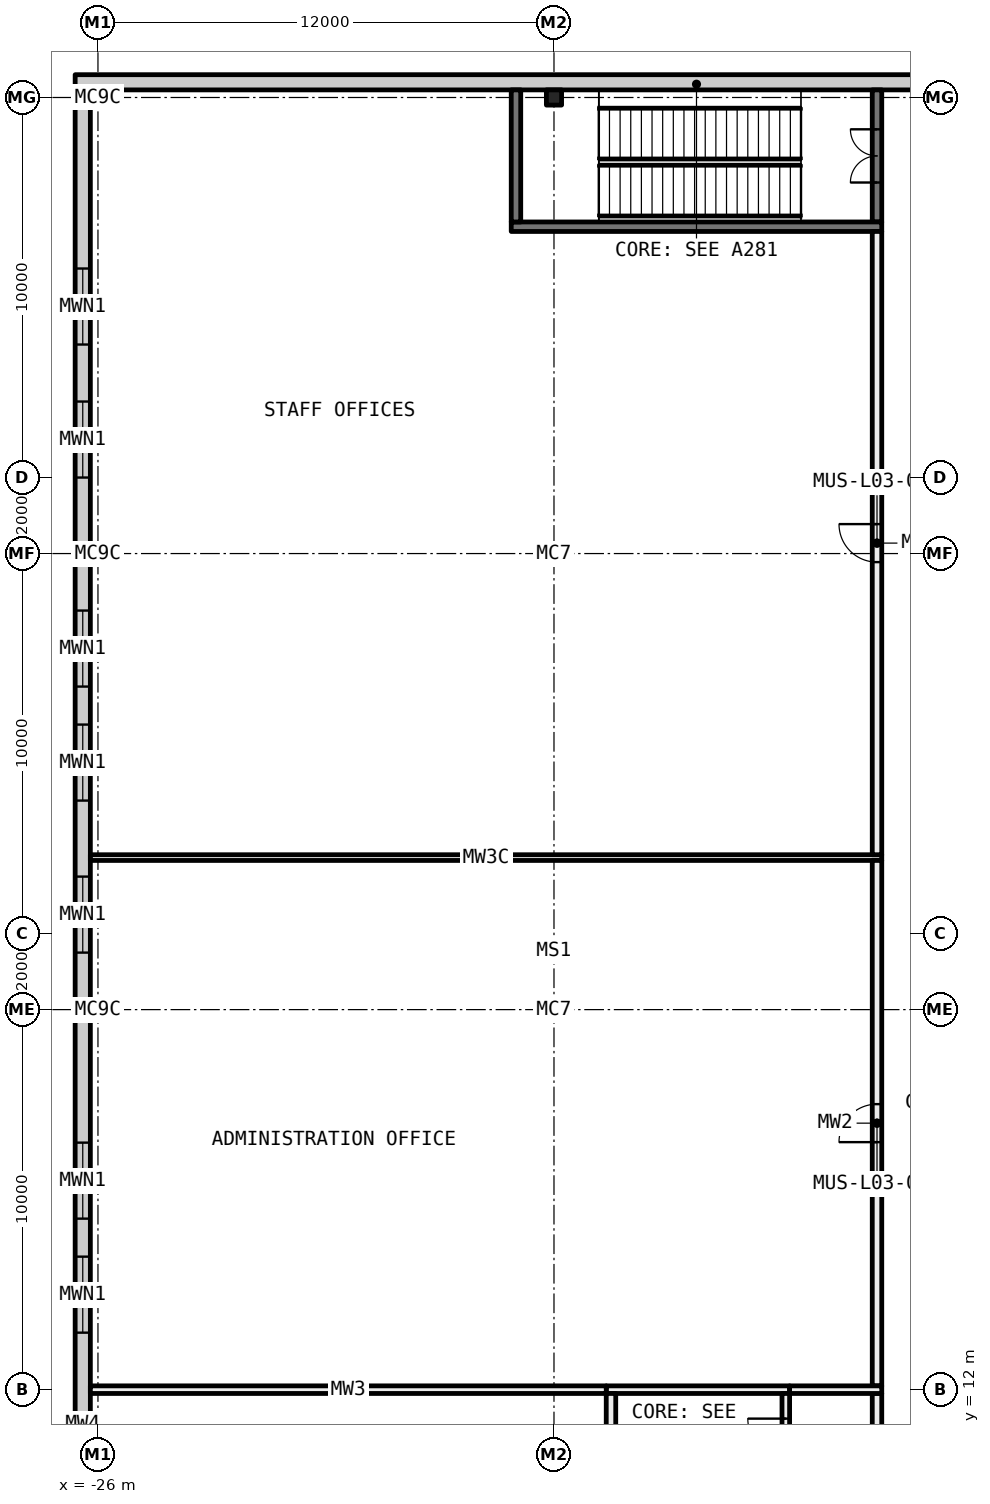
"""IFC4 building model, lengths in metres.
Left out: names, types, materials, properties, quantities, classifications, styles, units other than length and angle.
Written with IfcOpenShell. Run it as: python <this file> out.ifc"""

import sys

from ifc_helpers import new_model, si_unit, direction, frame, frame_2d, origin, origin_2d, place, context, subcontext, project, spatial, rectangle, i_section, extrude, element, fill, save


model = new_model("IFC4")
c1 = context("Model", 3, precision=1e-05, world=origin(), true_north=direction((0.0, 1.0)))
c2 = subcontext(c1, "Body", "Model", "MODEL_VIEW")
j1 = project(units=[si_unit("LENGTHUNIT", "METRE"), si_unit("PLANEANGLEUNIT", "RADIAN")], contexts=[c1])
p1 = place(None, origin())
s1 = spatial("IfcSite", under=j1, at=p1, CompositionType="ELEMENT")
p2 = place(p1, origin())
s2 = spatial("IfcBuilding", under=s1, at=p2, CompositionType="ELEMENT")
p3 = place(p2, frame((0.0, 0.0, 18.0)))
s3 = spatial("IfcBuildingStorey", under=s2, at=p3, CompositionType="ELEMENT", Elevation=18.0)
for number, where, z_axis, x_axis in (
    (1, (-26.0, 22.0, 0.0), (0.0, 0.0, 1.0), (1.0, 0.0, 0.0)),
    (2, (-26.0, 34.0, 0.0), (0.0, 0.0, 1.0), (1.0, 0.0, 0.0)),
    (3, (-26.0, 46.0, 0.0), (0.0, 0.0, 1.0), (1.0, 0.0, 0.0)),
):
    element("IfcColumn", number, at=place(p3, frame(where, z_axis=z_axis, x_axis=x_axis)), inside=s3, PredefinedType="COLUMN", context=c2, shape_type="SweptSolid", body=[
        extrude(i_section(OverallWidth=0.4, OverallDepth=0.4, WebThickness=0.013, FlangeThickness=0.021, FilletRadius=0.022, at=origin_2d()), origin(), (0.0, 0.0, 1.0), 5.6),
    ])
for number, where, z_axis, x_axis in (
    (4, (-14.0, 22.0, 0.0), (0.0, 0.0, 1.0), (1.0, 0.0, 0.0)),
    (5, (-14.0, 34.0, 0.0), (0.0, 0.0, 1.0), (1.0, 0.0, 0.0)),
):
    element("IfcColumn", number, at=place(p3, frame(where, z_axis=z_axis, x_axis=x_axis)), inside=s3, PredefinedType="COLUMN", context=c2, shape_type="SweptSolid", body=[
        extrude(i_section(OverallWidth=0.35, OverallDepth=0.35, WebThickness=0.012, FlangeThickness=0.019, FilletRadius=0.013, at=origin_2d()), origin(), (0.0, 0.0, 1.0), 5.6),
    ])
p4 = place(p3, frame((-14.0, 46.0, 0.0), z_axis=(0.0, 0.0, 1.0), x_axis=(1.0, 0.0, 0.0)))
e6 = element("IfcColumn", 6, at=p4, inside=s3, PredefinedType="COLUMN", context=c2, shape_type="SweptSolid", body=[
    extrude(i_section(OverallWidth=0.4, OverallDepth=0.4, WebThickness=0.013, FlangeThickness=0.021, FilletRadius=0.022, at=origin_2d()), origin(), (0.0, 0.0, 1.0), 5.6),
])
p5 = place(p3, frame((-12.625, 12.0, 0.0), z_axis=(0.0, 0.0, 1.0), x_axis=(1.0, 0.0, 0.0)))
e7 = element("IfcWall", 7, at=p5, inside=s3, PredefinedType="PARTITIONING", context=c2, shape_type="SweptSolid", body=[
    extrude(rectangle(XDim=4.825, YDim=0.2, at=frame_2d((2.413, 0.0))), origin(), (0.0, 0.0, 1.0), 5.6),
])
p6 = place(p3, frame((-12.5, 9.575, 0.0), z_axis=(0.0, 0.0, 1.0), x_axis=(0.0, 1.0, 0.0)))
e8 = element("IfcWall", 8, at=p6, inside=s3, PredefinedType="PARTITIONING", context=c2, shape_type="SweptSolid", body=[
    extrude(rectangle(XDim=2.325, YDim=0.25, at=frame_2d((1.163, 0.0))), origin(), (0.0, 0.0, 1.0), 5.6),
])
p7 = place(p3, frame((-26.2, 26.0, 0.0), z_axis=(0.0, 0.0, 1.0), x_axis=(1.0, 0.0, 0.0)))
e9 = element("IfcWall", 9, at=p7, inside=s3, PredefinedType="PARTITIONING", context=c2, shape_type="SweptSolid", body=[
    extrude(rectangle(XDim=20.825, YDim=0.15, at=frame_2d((10.413, 0.0))), origin(), (0.0, 0.0, 1.0), 5.6),
])
p8 = place(p3, frame((-5.5, 12.1, 0.0), z_axis=(0.0, 0.0, 1.0), x_axis=(0.0, 1.0, 0.0)))
e10 = element("IfcWall", 10, at=p8, inside=s3, PredefinedType="PARTITIONING", context=c2, shape_type="SweptSolid", body=[
    extrude(rectangle(XDim=13.825, YDim=0.25, at=frame_2d((6.913, 0.0))), origin(), (0.0, 0.0, 1.0), 5.6),
])
p9 = place(p8, frame((6.413, 0.0, 0.0)))
e11 = element("IfcOpeningElement", 11, at=p9, cuts=e10, PredefinedType="OPENING", context=c2, shape_type="SweptSolid", body=[
    extrude(rectangle(XDim=1.0, YDim=2.1, at=frame_2d((0.5, 1.05))), frame((0.0, 0.135, 0.0), z_axis=(0.0, -1.0, 0.0), x_axis=(1.0, 0.0, 0.0)), (0.0, 0.0, 1.0), 0.27),
])
p10 = place(p3, frame((-5.5, 26.075, 0.0), z_axis=(0.0, 0.0, 1.0), x_axis=(0.0, 1.0, 0.0)))
e12 = element("IfcWall", 12, at=p10, inside=s3, PredefinedType="PARTITIONING", context=c2, shape_type="SweptSolid", body=[
    extrude(rectangle(XDim=16.4, YDim=0.25, at=frame_2d((8.2, 0.0))), origin(), (0.0, 0.0, 1.0), 5.6),
])
p11 = place(p10, frame((7.7, 0.0, 0.0)))
e13 = element("IfcOpeningElement", 13, at=p11, cuts=e12, PredefinedType="OPENING", context=c2, shape_type="SweptSolid", body=[
    extrude(rectangle(XDim=1.0, YDim=2.1, at=frame_2d((0.5, 1.05))), frame((0.0, 0.135, 0.0), z_axis=(0.0, -1.0, 0.0), x_axis=(1.0, 0.0, 0.0)), (0.0, 0.0, 1.0), 0.27),
])
p12 = place(p3, frame((-5.5, 42.725, 0.0), z_axis=(0.0, 0.0, 1.0), x_axis=(0.0, 1.0, 0.0)))
e14 = element("IfcWall", 14, at=p12, inside=s3, PredefinedType="SHEAR", context=c2, shape_type="SweptSolid", body=[
    extrude(rectangle(XDim=3.475, YDim=0.25, at=frame_2d((1.737, 0.0))), origin(), (0.0, 0.0, 1.0), 5.6),
])
p13 = place(p12, frame((1.038, 0.0, 0.0)))
e15 = element("IfcOpeningElement", 15, at=p13, cuts=e14, PredefinedType="OPENING", context=c2, shape_type="SweptSolid", body=[
    extrude(rectangle(XDim=1.4, YDim=2.1, at=frame_2d((0.7, 1.05))), frame((0.0, 0.135, 0.0), z_axis=(0.0, -1.0, 0.0), x_axis=(1.0, 0.0, 0.0)), (0.0, 0.0, 1.0), 0.27),
])
p14 = place(p3, frame((-5.5, 4.625, 0.0), z_axis=(0.0, 0.0, 1.0), x_axis=(0.0, 1.0, 0.0)))
e16 = element("IfcWall", 16, at=p14, inside=s3, PredefinedType="PARTITIONING", context=c2, shape_type="SweptSolid", body=[
    extrude(rectangle(XDim=7.275, YDim=0.25, at=frame_2d((3.637, 0.0))), origin(), (0.0, 0.0, 1.0), 5.6),
])
p15 = place(p14, frame((3.138, 0.0, 0.0)))
e17 = element("IfcOpeningElement", 17, at=p15, cuts=e16, PredefinedType="OPENING", context=c2, shape_type="SweptSolid", body=[
    extrude(rectangle(XDim=1.0, YDim=2.1, at=frame_2d((0.5, 1.05))), frame((0.0, 0.135, 0.0), z_axis=(0.0, -1.0, 0.0), x_axis=(1.0, 0.0, 0.0)), (0.0, 0.0, 1.0), 0.27),
])
p16 = place(p3, frame((-26.2, 12.0, 0.0), z_axis=(0.0, 0.0, 1.0), x_axis=(1.0, 0.0, 0.0)))
e18 = element("IfcWall", 18, at=p16, inside=s3, PredefinedType="PARTITIONING", context=c2, shape_type="SweptSolid", body=[
    extrude(rectangle(XDim=13.575, YDim=0.2, at=frame_2d((6.788, 0.0))), origin(), (0.0, 0.0, 1.0), 5.6),
])
p17 = place(p3, frame((-15.125, 42.6, 0.0), z_axis=(0.0, 0.0, 1.0), x_axis=(1.0, 0.0, 0.0)))
e19 = element("IfcWall", 19, at=p17, inside=s3, PredefinedType="SHEAR", context=c2, shape_type="SweptSolid", body=[
    extrude(rectangle(XDim=9.75, YDim=0.25, at=frame_2d((4.875, 0.0))), origin(), (0.0, 0.0, 1.0), 5.6),
])
p18 = place(p3, frame((-15.0, 42.725, 0.0), z_axis=(0.0, 0.0, 1.0), x_axis=(0.0, 1.0, 0.0)))
e20 = element("IfcWall", 20, at=p18, inside=s3, PredefinedType="SHEAR", context=c2, shape_type="SweptSolid", body=[
    extrude(rectangle(XDim=3.475, YDim=0.25, at=frame_2d((1.737, 0.0))), origin(), (0.0, 0.0, 1.0), 5.6),
])
p19 = place(p3, frame((-7.9, 9.575, 0.0), z_axis=(0.0, 0.0, 1.0), x_axis=(0.0, 1.0, 0.0)))
e21 = element("IfcWall", 21, at=p19, inside=s3, PredefinedType="PARTITIONING", context=c2, shape_type="SweptSolid", body=[
    extrude(rectangle(XDim=2.325, YDim=0.2, at=frame_2d((1.163, 0.0))), origin(), (0.0, 0.0, 1.0), 5.6),
])
p20 = place(p19, frame((0.663, 0.0, 0.0)))
e22 = element("IfcOpeningElement", 22, at=p20, cuts=e21, PredefinedType="OPENING", context=c2, shape_type="SweptSolid", body=[
    extrude(rectangle(XDim=1.0, YDim=2.1, at=frame_2d((0.5, 1.05))), frame((0.0, 0.11, 0.0), z_axis=(0.0, -1.0, 0.0), x_axis=(1.0, 0.0, 0.0)), (0.0, 0.0, 1.0), 0.22),
])
p21 = place(p3, frame((-7.8, 12.0, 0.0), z_axis=(0.0, 0.0, 1.0), x_axis=(1.0, 0.0, 0.0)))
e23 = element("IfcWall", 23, at=p21, inside=s3, PredefinedType="PARTITIONING", context=c2, shape_type="SweptSolid", body=[
    extrude(rectangle(XDim=2.425, YDim=0.2, at=frame_2d((1.212, 0.0))), origin(), (0.0, 0.0, 1.0), 5.6),
])
p22 = place(p3, frame((-26.4, -26.2, -0.4), z_axis=(0.0, 0.0, 1.0), x_axis=(0.0, 1.0, 0.0)))
e24 = element("IfcWall", 24, at=p22, inside=s3, PredefinedType="STANDARD", context=c2, shape_type="SweptSolid", body=[
    extrude(rectangle(XDim=72.4, YDim=0.4, at=frame_2d((36.2, 0.0))), origin(), (0.0, 0.0, 1.0), 6.0),
])
p23 = place(p22, frame((27.7, 0.0, 1.3)))
e25 = element("IfcOpeningElement", 25, at=p23, cuts=e24, PredefinedType="OPENING", context=c2, shape_type="SweptSolid", body=[
    extrude(rectangle(XDim=2.0, YDim=3.6, at=frame_2d((1.0, 1.8))), frame((0.0, 0.21, 0.0), z_axis=(0.0, -1.0, 0.0), x_axis=(1.0, 0.0, 0.0)), (0.0, 0.0, 1.0), 0.42),
])
p24 = place(p22, frame((30.7, 0.0, 1.3)))
e26 = element("IfcOpeningElement", 26, at=p24, cuts=e24, PredefinedType="OPENING", context=c2, shape_type="SweptSolid", body=[
    extrude(rectangle(XDim=2.0, YDim=3.6, at=frame_2d((1.0, 1.8))), frame((0.0, 0.21, 0.0), z_axis=(0.0, -1.0, 0.0), x_axis=(1.0, 0.0, 0.0)), (0.0, 0.0, 1.0), 0.42),
])
p25 = place(p22, frame((33.2, 0.0, 1.3)))
e27 = element("IfcOpeningElement", 27, at=p25, cuts=e24, PredefinedType="OPENING", context=c2, shape_type="SweptSolid", body=[
    extrude(rectangle(XDim=2.0, YDim=3.6, at=frame_2d((1.0, 1.8))), frame((0.0, 0.21, 0.0), z_axis=(0.0, -1.0, 0.0), x_axis=(1.0, 0.0, 0.0)), (0.0, 0.0, 1.0), 0.42),
])
p26 = place(p22, frame((39.7, 0.0, 1.3)))
e28 = element("IfcOpeningElement", 28, at=p26, cuts=e24, PredefinedType="OPENING", context=c2, shape_type="SweptSolid", body=[
    extrude(rectangle(XDim=2.0, YDim=3.6, at=frame_2d((1.0, 1.8))), frame((0.0, 0.21, 0.0), z_axis=(0.0, -1.0, 0.0), x_axis=(1.0, 0.0, 0.0)), (0.0, 0.0, 1.0), 0.42),
])
p27 = place(p22, frame((42.7, 0.0, 1.3)))
e29 = element("IfcOpeningElement", 29, at=p27, cuts=e24, PredefinedType="OPENING", context=c2, shape_type="SweptSolid", body=[
    extrude(rectangle(XDim=2.0, YDim=3.6, at=frame_2d((1.0, 1.8))), frame((0.0, 0.21, 0.0), z_axis=(0.0, -1.0, 0.0), x_axis=(1.0, 0.0, 0.0)), (0.0, 0.0, 1.0), 0.42),
])
p28 = place(p22, frame((49.7, 0.0, 1.3)))
e30 = element("IfcOpeningElement", 30, at=p28, cuts=e24, PredefinedType="OPENING", context=c2, shape_type="SweptSolid", body=[
    extrude(rectangle(XDim=2.0, YDim=3.6, at=frame_2d((1.0, 1.8))), frame((0.0, 0.21, 0.0), z_axis=(0.0, -1.0, 0.0), x_axis=(1.0, 0.0, 0.0)), (0.0, 0.0, 1.0), 0.42),
])
p29 = place(p22, frame((53.7, 0.0, 1.3)))
e31 = element("IfcOpeningElement", 31, at=p29, cuts=e24, PredefinedType="OPENING", context=c2, shape_type="SweptSolid", body=[
    extrude(rectangle(XDim=2.0, YDim=3.6, at=frame_2d((1.0, 1.8))), frame((0.0, 0.21, 0.0), z_axis=(0.0, -1.0, 0.0), x_axis=(1.0, 0.0, 0.0)), (0.0, 0.0, 1.0), 0.42),
])
p30 = place(p22, frame((56.7, 0.0, 1.3)))
e32 = element("IfcOpeningElement", 32, at=p30, cuts=e24, PredefinedType="OPENING", context=c2, shape_type="SweptSolid", body=[
    extrude(rectangle(XDim=2.0, YDim=3.6, at=frame_2d((1.0, 1.8))), frame((0.0, 0.21, 0.0), z_axis=(0.0, -1.0, 0.0), x_axis=(1.0, 0.0, 0.0)), (0.0, 0.0, 1.0), 0.42),
])
p31 = place(p22, frame((62.2, 0.0, 1.3)))
e33 = element("IfcOpeningElement", 33, at=p31, cuts=e24, PredefinedType="OPENING", context=c2, shape_type="SweptSolid", body=[
    extrude(rectangle(XDim=2.0, YDim=3.6, at=frame_2d((1.0, 1.8))), frame((0.0, 0.21, 0.0), z_axis=(0.0, -1.0, 0.0), x_axis=(1.0, 0.0, 0.0)), (0.0, 0.0, 1.0), 0.42),
])
p32 = place(p22, frame((65.7, 0.0, 1.3)))
e34 = element("IfcOpeningElement", 34, at=p32, cuts=e24, PredefinedType="OPENING", context=c2, shape_type="SweptSolid", body=[
    extrude(rectangle(XDim=2.0, YDim=3.6, at=frame_2d((1.0, 1.8))), frame((0.0, 0.21, 0.0), z_axis=(0.0, -1.0, 0.0), x_axis=(1.0, 0.0, 0.0)), (0.0, 0.0, 1.0), 0.42),
])
p33 = place(p3, frame((-26.6, 46.4, -0.4), z_axis=(0.0, 0.0, 1.0), x_axis=(1.0, 0.0, 0.0)))
e35 = element("IfcWall", 35, at=p33, inside=s3, PredefinedType="STANDARD", context=c2, shape_type="SweptSolid", body=[
    extrude(rectangle(XDim=25.2, YDim=0.4, at=frame_2d((12.6, 0.0))), origin(), (0.0, 0.0, 1.0), 6.0),
])
p34 = place(p26, origin())
e36 = element("IfcWindow", 36, at=p34, inside=s3, PartitioningType="SINGLE_PANEL", PredefinedType="WINDOW", context=c2, shape_type="SweptSolid", body=[
    extrude(rectangle(XDim=2.0, YDim=3.6, at=frame_2d((1.0, 1.8))), frame((0.0, 0.03, 0.0), z_axis=(0.0, -1.0, 0.0), x_axis=(1.0, 0.0, 0.0)), (0.0, 0.0, 1.0), 0.06),
])
fill(e28, e36)
p35 = place(p27, origin())
e37 = element("IfcWindow", 37, at=p35, inside=s3, PartitioningType="SINGLE_PANEL", PredefinedType="WINDOW", context=c2, shape_type="SweptSolid", body=[
    extrude(rectangle(XDim=2.0, YDim=3.6, at=frame_2d((1.0, 1.8))), frame((0.0, 0.03, 0.0), z_axis=(0.0, -1.0, 0.0), x_axis=(1.0, 0.0, 0.0)), (0.0, 0.0, 1.0), 0.06),
])
fill(e29, e37)
p36 = place(p28, origin())
e38 = element("IfcWindow", 38, at=p36, inside=s3, PartitioningType="SINGLE_PANEL", PredefinedType="WINDOW", context=c2, shape_type="SweptSolid", body=[
    extrude(rectangle(XDim=2.0, YDim=3.6, at=frame_2d((1.0, 1.8))), frame((0.0, 0.03, 0.0), z_axis=(0.0, -1.0, 0.0), x_axis=(1.0, 0.0, 0.0)), (0.0, 0.0, 1.0), 0.06),
])
fill(e30, e38)
p37 = place(p29, origin())
e39 = element("IfcWindow", 39, at=p37, inside=s3, PartitioningType="SINGLE_PANEL", PredefinedType="WINDOW", context=c2, shape_type="SweptSolid", body=[
    extrude(rectangle(XDim=2.0, YDim=3.6, at=frame_2d((1.0, 1.8))), frame((0.0, 0.03, 0.0), z_axis=(0.0, -1.0, 0.0), x_axis=(1.0, 0.0, 0.0)), (0.0, 0.0, 1.0), 0.06),
])
fill(e31, e39)
p38 = place(p30, origin())
e40 = element("IfcWindow", 40, at=p38, inside=s3, PartitioningType="SINGLE_PANEL", PredefinedType="WINDOW", context=c2, shape_type="SweptSolid", body=[
    extrude(rectangle(XDim=2.0, YDim=3.6, at=frame_2d((1.0, 1.8))), frame((0.0, 0.03, 0.0), z_axis=(0.0, -1.0, 0.0), x_axis=(1.0, 0.0, 0.0)), (0.0, 0.0, 1.0), 0.06),
])
fill(e32, e40)
p39 = place(p31, origin())
e41 = element("IfcWindow", 41, at=p39, inside=s3, PartitioningType="SINGLE_PANEL", PredefinedType="WINDOW", context=c2, shape_type="SweptSolid", body=[
    extrude(rectangle(XDim=2.0, YDim=3.6, at=frame_2d((1.0, 1.8))), frame((0.0, 0.03, 0.0), z_axis=(0.0, -1.0, 0.0), x_axis=(1.0, 0.0, 0.0)), (0.0, 0.0, 1.0), 0.06),
])
fill(e33, e41)
p40 = place(p32, origin())
e42 = element("IfcWindow", 42, at=p40, inside=s3, PartitioningType="SINGLE_PANEL", PredefinedType="WINDOW", context=c2, shape_type="SweptSolid", body=[
    extrude(rectangle(XDim=2.0, YDim=3.6, at=frame_2d((1.0, 1.8))), frame((0.0, 0.03, 0.0), z_axis=(0.0, -1.0, 0.0), x_axis=(1.0, 0.0, 0.0)), (0.0, 0.0, 1.0), 0.06),
])
fill(e34, e42)
p41 = place(p13, origin())
e43 = element("IfcDoor", 43, at=p41, inside=s3, OperationType="DOUBLE_DOOR_SINGLE_SWING", PredefinedType="DOOR", context=c2, shape_type="SweptSolid", body=[
    extrude(rectangle(XDim=1.4, YDim=2.1, at=frame_2d((0.7, 1.05))), frame((0.0, 0.025, 0.0), z_axis=(0.0, -1.0, 0.0), x_axis=(1.0, 0.0, 0.0)), (0.0, 0.0, 1.0), 0.05),
])
fill(e15, e43)
p42 = place(p20, origin())
e44 = element("IfcDoor", 44, at=p42, inside=s3, OperationType="SINGLE_SWING_LEFT", PredefinedType="DOOR", context=c2, shape_type="SweptSolid", body=[
    extrude(rectangle(XDim=1.0, YDim=2.1, at=frame_2d((0.5, 1.05))), frame((0.0, 0.025, 0.0), z_axis=(0.0, -1.0, 0.0), x_axis=(1.0, 0.0, 0.0)), (0.0, 0.0, 1.0), 0.05),
])
fill(e22, e44)
p43 = place(p9, origin())
e45 = element("IfcDoor", 45, at=p43, inside=s3, OperationType="SINGLE_SWING_RIGHT", PredefinedType="DOOR", context=c2, shape_type="SweptSolid", body=[
    extrude(rectangle(XDim=1.0, YDim=2.1, at=frame_2d((0.5, 1.05))), frame((0.0, 0.025, 0.0), z_axis=(0.0, -1.0, 0.0), x_axis=(1.0, 0.0, 0.0)), (0.0, 0.0, 1.0), 0.05),
])
fill(e11, e45)
p44 = place(p11, origin())
e46 = element("IfcDoor", 46, at=p44, inside=s3, OperationType="SINGLE_SWING_LEFT", PredefinedType="DOOR", context=c2, shape_type="SweptSolid", body=[
    extrude(rectangle(XDim=1.0, YDim=2.1, at=frame_2d((0.5, 1.05))), frame((0.0, 0.025, 0.0), z_axis=(0.0, -1.0, 0.0), x_axis=(1.0, 0.0, 0.0)), (0.0, 0.0, 1.0), 0.05),
])
fill(e13, e46)
save(model, sys.argv[1])
